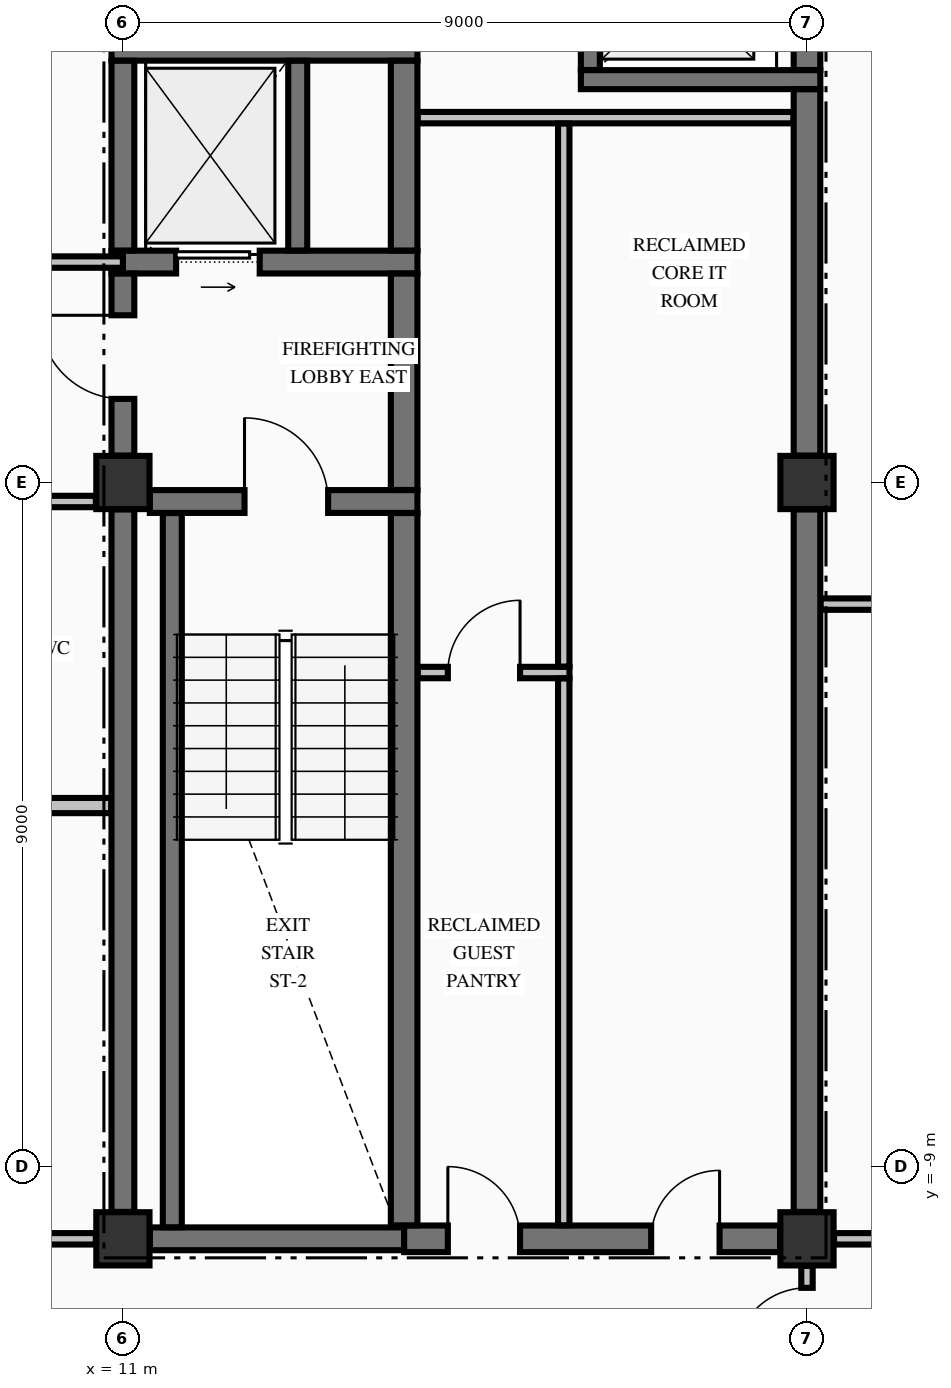
"""IFC4 building model, lengths in metres.
Left out: names, types, materials, properties, quantities, classifications, styles, units other than length and angle.
Written with IfcOpenShell. Run it as: python <this file> out.ifc"""

import sys

from ifc_helpers import new_model, si_unit, direction, frame, frame_2d, origin, origin_2d, place, context, subcontext, project, spatial, rectangle, extrude, element, fill, save


model = new_model("IFC4")
c1 = context("Model", 3, precision=1e-05, world=origin(), true_north=direction((0.0, 1.0)))
c2 = subcontext(c1, "Body", "Model", "MODEL_VIEW")
j1 = project(units=[si_unit("LENGTHUNIT", "METRE"), si_unit("PLANEANGLEUNIT", "RADIAN")], contexts=[c1])
p1 = place(None, origin())
s1 = spatial("IfcSite", under=j1, at=p1, CompositionType="ELEMENT")
p2 = place(p1, origin())
s2 = spatial("IfcBuilding", under=s1, at=p2, CompositionType="ELEMENT")
p3 = place(p2, frame((0.0, 0.0, 233.28)))
s3 = spatial("IfcBuildingStorey", under=s2, at=p3, CompositionType="ELEMENT", Elevation=233.28)
for number, where, z_axis, x_axis in (
    (1, (11.0, -9.95, -0.25), (0.0, 0.0, 1.0), (1.0, 0.0, 0.0)),
    (2, (11.0, 0.0, -0.25), (0.0, 0.0, 1.0), (1.0, 0.0, 0.0)),
    (3, (20.0, -9.95, -0.25), (0.0, 0.0, 1.0), (1.0, 0.0, 0.0)),
    (4, (20.0, 0.0, -0.25), (0.0, 0.0, 1.0), (1.0, 0.0, 0.0)),
):
    element("IfcColumn", number, at=place(p3, frame(where, z_axis=z_axis, x_axis=x_axis)), inside=s3, PredefinedType="COLUMN", context=c2, shape_type="SweptSolid", body=[
        extrude(rectangle(XDim=0.7, YDim=0.7, at=origin_2d()), origin(), (0.0, 0.0, 1.0), 3.23),
    ])
p4 = place(p3, frame((11.354, -9.95, 0.0), z_axis=(0.0, 0.0, 1.0), x_axis=(1.0, 0.0, 0.0)))
e5 = element("IfcWall", 5, at=p4, inside=s3, PredefinedType="SHEAR", context=c2, shape_type="SweptSolid", body=[
    extrude(rectangle(XDim=3.346, YDim=0.3, at=frame_2d((1.673, 0.0))), origin(), (0.0, 0.0, 1.0), 2.98),
])
p5 = place(p3, frame((14.7, -9.95, 0.0), z_axis=(0.0, 0.0, 1.0), x_axis=(1.0, 0.0, 0.0)))
e6 = element("IfcWall", 6, at=p5, inside=s3, PredefinedType="SHEAR", context=c2, shape_type="SweptSolid", body=[
    extrude(rectangle(XDim=4.946, YDim=0.35, at=frame_2d((2.473, 0.0))), origin(), (0.0, 0.0, 1.0), 2.98),
])
p6 = place(p5, frame((3.25, 0.0, 0.0)))
e7 = element("IfcOpeningElement", 7, at=p6, cuts=e6, PredefinedType="OPENING", context=c2, shape_type="SweptSolid", body=[
    extrude(rectangle(XDim=0.9, YDim=2.15, at=frame_2d((0.45, 1.075))), frame((0.0, 0.185, 0.0), z_axis=(0.0, -1.0, 0.0), x_axis=(1.0, 0.0, 0.0)), (0.0, 0.0, 1.0), 0.37),
])
p7 = place(p5, frame((0.575, 0.0, 0.0)))
e8 = element("IfcOpeningElement", 8, at=p7, cuts=e6, PredefinedType="OPENING", context=c2, shape_type="SweptSolid", body=[
    extrude(rectangle(XDim=0.95, YDim=2.15, at=frame_2d((0.475, 1.075))), frame((0.0, 0.185, 0.0), z_axis=(0.0, -1.0, 0.0), x_axis=(1.0, 0.0, 0.0)), (0.0, 0.0, 1.0), 0.37),
])
p8 = place(p3, frame((11.354, -0.25, 0.0), z_axis=(0.0, 0.0, 1.0), x_axis=(1.0, 0.0, 0.0)))
e9 = element("IfcWall", 9, at=p8, inside=s3, PredefinedType="SHEAR", context=c2, shape_type="SweptSolid", body=[
    extrude(rectangle(XDim=3.521, YDim=0.3, at=frame_2d((1.76, 0.0))), origin(), (0.0, 0.0, 1.0), 2.98),
])
p9 = place(p8, frame((1.246, 0.0, 0.0)))
e10 = element("IfcOpeningElement", 10, at=p9, cuts=e9, PredefinedType="OPENING", context=c2, shape_type="SweptSolid", body=[
    extrude(rectangle(XDim=1.1, YDim=2.15, at=frame_2d((0.55, 1.075))), frame((0.0, 0.16, 0.0), z_axis=(0.0, -1.0, 0.0), x_axis=(1.0, 0.0, 0.0)), (0.0, 0.0, 1.0), 0.32),
])
p10 = place(p3, frame((10.85, 2.9, 0.0), z_axis=(0.0, 0.0, 1.0), x_axis=(1.0, 0.0, 0.0)))
e11 = element("IfcWall", 11, at=p10, inside=s3, PredefinedType="SHEAR", context=c2, shape_type="SweptSolid", body=[
    extrude(rectangle(XDim=4.025, YDim=0.3, at=frame_2d((2.012, 0.0))), origin(), (0.0, 0.0, 1.0), 2.98),
])
p11 = place(p10, frame((0.85, 0.0, 0.0)))
e12 = element("IfcOpeningElement", 12, at=p11, cuts=e11, PredefinedType="OPENING", context=c2, shape_type="SweptSolid", body=[
    extrude(rectangle(XDim=1.1, YDim=2.2, at=frame_2d((0.55, 1.1))), frame((0.0, 0.16, 0.0), z_axis=(0.0, -1.0, 0.0), x_axis=(1.0, 0.0, 0.0)), (0.0, 0.0, 1.0), 0.32),
])
p12 = place(p3, frame((17.025, 5.3, 0.0), z_axis=(0.0, 0.0, 1.0), x_axis=(1.0, 0.0, 0.0)))
e13 = element("IfcWall", 13, at=p12, inside=s3, PredefinedType="SOLIDWALL", context=c2, shape_type="SweptSolid", body=[
    extrude(rectangle(XDim=3.15, YDim=0.25, at=frame_2d((1.575, 0.0))), origin(), (0.0, 0.0, 1.0), 2.98),
])
p13 = place(p3, frame((10.85, 5.7, 0.0), z_axis=(0.0, 0.0, 1.0), x_axis=(1.0, 0.0, 0.0)))
e14 = element("IfcWall", 14, at=p13, inside=s3, PredefinedType="SHEAR", context=c2, shape_type="SweptSolid", body=[
    extrude(rectangle(XDim=4.025, YDim=0.3, at=frame_2d((2.012, 0.0))), origin(), (0.0, 0.0, 1.0), 2.98),
])
p14 = place(p3, frame((-10.644, -9.95, 0.0), z_axis=(0.0, 0.0, 1.0), x_axis=(1.0, 0.0, 0.0)))
e15 = element("IfcWall", 15, at=p14, inside=s3, PredefinedType="PARTITIONING", context=c2, shape_type="SweptSolid", body=[
    extrude(rectangle(XDim=21.288, YDim=0.15, at=frame_2d((10.644, 0.0))), origin(), (0.0, 0.0, 1.0), 2.98),
])
p15 = place(p14, frame((8.294, 0.0, 0.0)))
e16 = element("IfcOpeningElement", 16, at=p15, cuts=e15, PredefinedType="OPENING", context=c2, shape_type="SweptSolid", body=[
    extrude(rectangle(XDim=1.1, YDim=2.15, at=frame_2d((0.55, 1.075))), frame((0.0, 0.085, 0.0), z_axis=(0.0, -1.0, 0.0), x_axis=(1.0, 0.0, 0.0)), (0.0, 0.0, 1.0), 0.17),
])
p16 = place(p14, frame((13.769, 0.0, 0.0)))
e17 = element("IfcOpeningElement", 17, at=p16, cuts=e15, PredefinedType="OPENING", context=c2, shape_type="SweptSolid", body=[
    extrude(rectangle(XDim=0.95, YDim=2.15, at=frame_2d((0.475, 1.075))), frame((0.0, 0.085, 0.0), z_axis=(0.0, -1.0, 0.0), x_axis=(1.0, 0.0, 0.0)), (0.0, 0.0, 1.0), 0.17),
])
p17 = place(p14, frame((17.994, 0.0, 0.0)))
e18 = element("IfcOpeningElement", 18, at=p17, cuts=e15, PredefinedType="OPENING", context=c2, shape_type="SweptSolid", body=[
    extrude(rectangle(XDim=0.9, YDim=2.15, at=frame_2d((0.45, 1.075))), frame((0.0, 0.085, 0.0), z_axis=(0.0, -1.0, 0.0), x_axis=(1.0, 0.0, 0.0)), (0.0, 0.0, 1.0), 0.17),
])
p18 = place(p3, frame((20.356, -9.95, 0.0), z_axis=(0.0, 0.0, 1.0), x_axis=(1.0, 0.0, 0.0)))
e19 = element("IfcWall", 19, at=p18, inside=s3, PredefinedType="PARTITIONING", context=c2, shape_type="SweptSolid", body=[
    extrude(rectangle(XDim=5.479, YDim=0.15, at=frame_2d((2.74, 0.0))), origin(), (0.0, 0.0, 1.0), 2.98),
])
p19 = place(p18, frame((2.169, 0.0, 0.0)))
e20 = element("IfcOpeningElement", 20, at=p19, cuts=e19, PredefinedType="OPENING", context=c2, shape_type="SweptSolid", body=[
    extrude(rectangle(XDim=0.95, YDim=2.15, at=frame_2d((0.475, 1.075))), frame((0.0, 0.085, 0.0), z_axis=(0.0, -1.0, 0.0), x_axis=(1.0, 0.0, 0.0)), (0.0, 0.0, 1.0), 0.17),
])
p20 = place(p3, frame((-0.775, -4.25, 0.0), z_axis=(0.0, 0.0, 1.0), x_axis=(1.0, 0.0, 0.0)))
e21 = element("IfcWall", 21, at=p20, inside=s3, PredefinedType="PARTITIONING", context=c2, shape_type="SweptSolid", body=[
    extrude(rectangle(XDim=11.622, YDim=0.2, at=frame_2d((5.811, 0.0))), origin(), (0.0, 0.0, 1.0), 2.98),
])
p21 = place(p3, frame((14.878, -2.5, 0.0), z_axis=(0.0, 0.0, 1.0), x_axis=(1.0, 0.0, 0.0)))
e22 = element("IfcWall", 22, at=p21, inside=s3, PredefinedType="PARTITIONING", context=c2, shape_type="SweptSolid", body=[
    extrude(rectangle(XDim=1.997, YDim=0.15, at=frame_2d((0.999, 0.0))), origin(), (0.0, 0.0, 1.0), 2.98),
])
p22 = place(p21, frame((0.397, 0.0, 0.0)))
e23 = element("IfcOpeningElement", 23, at=p22, cuts=e22, PredefinedType="OPENING", context=c2, shape_type="SweptSolid", body=[
    extrude(rectangle(XDim=0.95, YDim=2.15, at=frame_2d((0.475, 1.075))), frame((0.0, 0.085, 0.0), z_axis=(0.0, -1.0, 0.0), x_axis=(1.0, 0.0, 0.0)), (0.0, 0.0, 1.0), 0.17),
])
p23 = place(p3, frame((20.178, -1.6, 0.0), z_axis=(0.0, 0.0, 1.0), x_axis=(1.0, 0.0, 0.0)))
e24 = element("IfcWall", 24, at=p23, inside=s3, PredefinedType="PARTITIONING", context=c2, shape_type="SweptSolid", body=[
    extrude(rectangle(XDim=5.657, YDim=0.15, at=frame_2d((2.829, 0.0))), origin(), (0.0, 0.0, 1.0), 2.98),
])
p24 = place(p3, frame((-10.644, -0.25, 0.0), z_axis=(0.0, 0.0, 1.0), x_axis=(1.0, 0.0, 0.0)))
e25 = element("IfcWall", 25, at=p24, inside=s3, PredefinedType="PARTITIONING", context=c2, shape_type="SweptSolid", body=[
    extrude(rectangle(XDim=21.288, YDim=0.15, at=frame_2d((10.644, 0.0))), origin(), (0.0, 0.0, 1.0), 2.98),
])
p25 = place(p24, frame((8.294, 0.0, 0.0)))
e26 = element("IfcOpeningElement", 26, at=p25, cuts=e25, PredefinedType="OPENING", context=c2, shape_type="SweptSolid", body=[
    extrude(rectangle(XDim=1.1, YDim=2.15, at=frame_2d((0.55, 1.075))), frame((0.0, 0.085, 0.0), z_axis=(0.0, -1.0, 0.0), x_axis=(1.0, 0.0, 0.0)), (0.0, 0.0, 1.0), 0.17),
])
p26 = place(p24, frame((3.169, 0.0, 0.0)))
e27 = element("IfcOpeningElement", 27, at=p26, cuts=e25, PredefinedType="OPENING", context=c2, shape_type="SweptSolid", body=[
    extrude(rectangle(XDim=1.05, YDim=2.15, at=frame_2d((0.525, 1.075))), frame((0.0, 0.085, 0.0), z_axis=(0.0, -1.0, 0.0), x_axis=(1.0, 0.0, 0.0)), (0.0, 0.0, 1.0), 0.17),
])
p27 = place(p24, frame((15.319, 0.0, 0.0)))
e28 = element("IfcOpeningElement", 28, at=p27, cuts=e25, PredefinedType="OPENING", context=c2, shape_type="SweptSolid", body=[
    extrude(rectangle(XDim=0.95, YDim=2.15, at=frame_2d((0.475, 1.075))), frame((0.0, 0.085, 0.0), z_axis=(0.0, -1.0, 0.0), x_axis=(1.0, 0.0, 0.0)), (0.0, 0.0, 1.0), 0.17),
])
p28 = place(p3, frame((-11.0, 2.9, 0.0), z_axis=(0.0, 0.0, 1.0), x_axis=(1.0, 0.0, 0.0)))
e29 = element("IfcWall", 29, at=p28, inside=s3, PredefinedType="PARTITIONING", context=c2, shape_type="SweptSolid", body=[
    extrude(rectangle(XDim=22.0, YDim=0.15, at=frame_2d((11.0, 0.0))), origin(), (0.0, 0.0, 1.0), 2.98),
])
p29 = place(p28, frame((8.65, 0.0, 0.0)))
e30 = element("IfcOpeningElement", 30, at=p29, cuts=e29, PredefinedType="OPENING", context=c2, shape_type="SweptSolid", body=[
    extrude(rectangle(XDim=1.1, YDim=2.15, at=frame_2d((0.55, 1.075))), frame((0.0, 0.085, 0.0), z_axis=(0.0, -1.0, 0.0), x_axis=(1.0, 0.0, 0.0)), (0.0, 0.0, 1.0), 0.17),
])
p30 = place(p28, frame((3.525, 0.0, 0.0)))
e31 = element("IfcOpeningElement", 31, at=p30, cuts=e29, PredefinedType="OPENING", context=c2, shape_type="SweptSolid", body=[
    extrude(rectangle(XDim=1.05, YDim=2.15, at=frame_2d((0.525, 1.075))), frame((0.0, 0.085, 0.0), z_axis=(0.0, -1.0, 0.0), x_axis=(1.0, 0.0, 0.0)), (0.0, 0.0, 1.0), 0.17),
])
p31 = place(p28, frame((12.225, 0.0, 0.0)))
e32 = element("IfcOpeningElement", 32, at=p31, cuts=e29, PredefinedType="OPENING", context=c2, shape_type="SweptSolid", body=[
    extrude(rectangle(XDim=0.95, YDim=2.15, at=frame_2d((0.475, 1.075))), frame((0.0, 0.085, 0.0), z_axis=(0.0, -1.0, 0.0), x_axis=(1.0, 0.0, 0.0)), (0.0, 0.0, 1.0), 0.17),
])
p32 = place(p28, frame((18.075, 0.0, 0.0)))
e33 = element("IfcOpeningElement", 33, at=p32, cuts=e29, PredefinedType="OPENING", context=c2, shape_type="SweptSolid", body=[
    extrude(rectangle(XDim=0.95, YDim=2.15, at=frame_2d((0.475, 1.075))), frame((0.0, 0.085, 0.0), z_axis=(0.0, -1.0, 0.0), x_axis=(1.0, 0.0, 0.0)), (0.0, 0.0, 1.0), 0.17),
])
p33 = place(p3, frame((14.878, 4.8, 0.0), z_axis=(0.0, 0.0, 1.0), x_axis=(1.0, 0.0, 0.0)))
e34 = element("IfcWall", 34, at=p33, inside=s3, PredefinedType="PARTITIONING", context=c2, shape_type="SweptSolid", body=[
    extrude(rectangle(XDim=4.944, YDim=0.15, at=frame_2d((2.472, 0.0))), origin(), (0.0, 0.0, 1.0), 2.98),
])
p34 = place(p3, frame((11.0, -9.596, 0.0), z_axis=(0.0, 0.0, 1.0), x_axis=(0.0, 1.0, 0.0)))
e35 = element("IfcWall", 35, at=p34, inside=s3, PredefinedType="SHEAR", context=c2, shape_type="SweptSolid", body=[
    extrude(rectangle(XDim=9.242, YDim=0.3, at=frame_2d((4.621, 0.0))), origin(), (0.0, 0.0, 1.0), 2.98),
])
p35 = place(p3, frame((11.0, 0.354, 0.0), z_axis=(0.0, 0.0, 1.0), x_axis=(0.0, 1.0, 0.0)))
e36 = element("IfcWall", 36, at=p35, inside=s3, PredefinedType="SHEAR", context=c2, shape_type="SweptSolid", body=[
    extrude(rectangle(XDim=2.394, YDim=0.3, at=frame_2d((1.197, 0.0))), origin(), (0.0, 0.0, 1.0), 2.98),
])
p36 = place(p35, frame((0.746, 0.0, 0.0)))
e37 = element("IfcOpeningElement", 37, at=p36, cuts=e36, PredefinedType="OPENING", context=c2, shape_type="SweptSolid", body=[
    extrude(rectangle(XDim=1.1, YDim=2.15, at=frame_2d((0.55, 1.075))), frame((0.0, 0.16, 0.0), z_axis=(0.0, -1.0, 0.0), x_axis=(1.0, 0.0, 0.0)), (0.0, 0.0, 1.0), 0.32),
])
p37 = place(p3, frame((11.0, 3.052, 0.0), z_axis=(0.0, 0.0, 1.0), x_axis=(0.0, 1.0, 0.0)))
e38 = element("IfcWall", 38, at=p37, inside=s3, PredefinedType="SHEAR", context=c2, shape_type="SweptSolid", body=[
    extrude(rectangle(XDim=2.496, YDim=0.3, at=frame_2d((1.248, 0.0))), origin(), (0.0, 0.0, 1.0), 2.98),
])
p38 = place(p3, frame((11.65, -9.798, 0.0), z_axis=(0.0, 0.0, 1.0), x_axis=(0.0, 1.0, 0.0)))
e39 = element("IfcWall", 39, at=p38, inside=s3, PredefinedType="SOLIDWALL", context=c2, shape_type="SweptSolid", body=[
    extrude(rectangle(XDim=9.396, YDim=0.25, at=frame_2d((4.698, 0.0))), origin(), (0.0, 0.0, 1.0), 2.98),
])
p39 = place(p3, frame((13.3, 3.052, 0.0), z_axis=(0.0, 0.0, 1.0), x_axis=(0.0, 1.0, 0.0)))
e40 = element("IfcWall", 40, at=p39, inside=s3, PredefinedType="SOLIDWALL", context=c2, shape_type="SweptSolid", body=[
    extrude(rectangle(XDim=2.496, YDim=0.25, at=frame_2d((1.248, 0.0))), origin(), (0.0, 0.0, 1.0), 2.98),
])
p40 = place(p3, frame((14.7, -9.773, 0.0), z_axis=(0.0, 0.0, 1.0), x_axis=(0.0, 1.0, 0.0)))
e41 = element("IfcWall", 41, at=p40, inside=s3, PredefinedType="SHEAR", context=c2, shape_type="SweptSolid", body=[
    extrude(rectangle(XDim=9.371, YDim=0.35, at=frame_2d((4.686, 0.0))), origin(), (0.0, 0.0, 1.0), 2.98),
])
p41 = place(p3, frame((14.7, -0.098, 0.0), z_axis=(0.0, 0.0, 1.0), x_axis=(0.0, 1.0, 0.0)))
e42 = element("IfcWall", 42, at=p41, inside=s3, PredefinedType="SHEAR", context=c2, shape_type="SweptSolid", body=[
    extrude(rectangle(XDim=2.846, YDim=0.35, at=frame_2d((1.423, 0.0))), origin(), (0.0, 0.0, 1.0), 2.98),
])
p42 = place(p3, frame((14.7, 3.052, 0.0), z_axis=(0.0, 0.0, 1.0), x_axis=(0.0, 1.0, 0.0)))
e43 = element("IfcWall", 43, at=p42, inside=s3, PredefinedType="SHEAR", context=c2, shape_type="SweptSolid", body=[
    extrude(rectangle(XDim=2.496, YDim=0.35, at=frame_2d((1.248, 0.0))), origin(), (0.0, 0.0, 1.0), 2.98),
])
p43 = place(p3, frame((17.15, 5.427, 0.0), z_axis=(0.0, 0.0, 1.0), x_axis=(0.0, 1.0, 0.0)))
e44 = element("IfcWall", 44, at=p43, inside=s3, PredefinedType="SOLIDWALL", context=c2, shape_type="SweptSolid", body=[
    extrude(rectangle(XDim=2.196, YDim=0.25, at=frame_2d((1.098, 0.0))), origin(), (0.0, 0.0, 1.0), 2.98),
])
p44 = place(p43, frame((0.548, 0.0, 0.0)))
e45 = element("IfcOpeningElement", 45, at=p44, cuts=e44, PredefinedType="OPENING", context=c2, shape_type="SweptSolid", body=[
    extrude(rectangle(XDim=1.1, YDim=2.2, at=frame_2d((0.55, 1.1))), frame((0.0, 0.135, 0.0), z_axis=(0.0, -1.0, 0.0), x_axis=(1.0, 0.0, 0.0)), (0.0, 0.0, 1.0), 0.27),
])
p45 = place(p3, frame((20.0, -9.596, 0.0), z_axis=(0.0, 0.0, 1.0), x_axis=(0.0, 1.0, 0.0)))
e46 = element("IfcWall", 46, at=p45, inside=s3, PredefinedType="SHEAR", context=c2, shape_type="SweptSolid", body=[
    extrude(rectangle(XDim=9.242, YDim=0.35, at=frame_2d((4.621, 0.0))), origin(), (0.0, 0.0, 1.0), 2.98),
])
p46 = place(p3, frame((20.0, 0.354, 0.0), z_axis=(0.0, 0.0, 1.0), x_axis=(0.0, 1.0, 0.0)))
e47 = element("IfcWall", 47, at=p46, inside=s3, PredefinedType="SHEAR", context=c2, shape_type="SweptSolid", body=[
    extrude(rectangle(XDim=4.819, YDim=0.35, at=frame_2d((2.41, 0.0))), origin(), (0.0, 0.0, 1.0), 2.98),
])
p47 = place(p3, frame((20.0, 5.427, 0.0), z_axis=(0.0, 0.0, 1.0), x_axis=(0.0, 1.0, 0.0)))
e48 = element("IfcWall", 48, at=p47, inside=s3, PredefinedType="SHEAR", context=c2, shape_type="SweptSolid", body=[
    extrude(rectangle(XDim=2.196, YDim=0.35, at=frame_2d((1.098, 0.0))), origin(), (0.0, 0.0, 1.0), 2.98),
])
p48 = place(p3, frame((16.8, -9.772, 0.0), z_axis=(0.0, 0.0, 1.0), x_axis=(0.0, 1.0, 0.0)))
e49 = element("IfcWall", 49, at=p48, inside=s3, PredefinedType="PARTITIONING", context=c2, shape_type="SweptSolid", body=[
    extrude(rectangle(XDim=7.194, YDim=0.15, at=frame_2d((3.597, 0.0))), origin(), (0.0, 0.0, 1.0), 2.98),
])
p49 = place(p3, frame((16.8, -2.422, 0.0), z_axis=(0.0, 0.0, 1.0), x_axis=(0.0, 1.0, 0.0)))
e50 = element("IfcWall", 50, at=p49, inside=s3, PredefinedType="PARTITIONING", context=c2, shape_type="SweptSolid", body=[
    extrude(rectangle(XDim=7.144, YDim=0.15, at=frame_2d((3.572, 0.0))), origin(), (0.0, 0.0, 1.0), 2.98),
])
p50 = place(p3, frame((20.0, -12.122, 0.0), z_axis=(0.0, 0.0, 1.0), x_axis=(0.0, 1.0, 0.0)))
e51 = element("IfcWall", 51, at=p50, inside=s3, PredefinedType="PARTITIONING", context=c2, shape_type="SweptSolid", body=[
    extrude(rectangle(XDim=1.816, YDim=0.15, at=frame_2d((0.908, 0.0))), origin(), (0.0, 0.0, 1.0), 2.98),
])
p51 = place(p50, frame((0.577, 0.0, 0.0)))
e52 = element("IfcOpeningElement", 52, at=p51, cuts=e51, PredefinedType="OPENING", context=c2, shape_type="SweptSolid", body=[
    extrude(rectangle(XDim=0.95, YDim=2.15, at=frame_2d((0.475, 1.075))), frame((0.0, 0.085, 0.0), z_axis=(0.0, -1.0, 0.0), x_axis=(1.0, 0.0, 0.0)), (0.0, 0.0, 1.0), 0.17),
])
p52 = place(p9, origin())
e53 = element("IfcDoor", 53, at=p52, inside=s3, OperationType="SINGLE_SWING_LEFT", PredefinedType="DOOR", context=c2, shape_type="SweptSolid", body=[
    extrude(rectangle(XDim=1.1, YDim=2.15, at=frame_2d((0.55, 1.075))), frame((0.0, 0.025, 0.0), z_axis=(0.0, -1.0, 0.0), x_axis=(1.0, 0.0, 0.0)), (0.0, 0.0, 1.0), 0.05),
])
fill(e10, e53)
p53 = place(p36, origin())
e54 = element("IfcDoor", 54, at=p53, inside=s3, OperationType="SINGLE_SWING_RIGHT", PredefinedType="DOOR", context=c2, shape_type="SweptSolid", body=[
    extrude(rectangle(XDim=1.1, YDim=2.15, at=frame_2d((0.55, 1.075))), frame((0.0, 0.025, 0.0), z_axis=(0.0, -1.0, 0.0), x_axis=(1.0, 0.0, 0.0)), (0.0, 0.0, 1.0), 0.05),
])
fill(e37, e54)
p54 = place(p11, origin())
e55 = element("IfcDoor", 55, at=p54, inside=s3, OperationType="SLIDING_TO_RIGHT", PredefinedType="DOOR", context=c2, shape_type="SweptSolid", body=[
    extrude(rectangle(XDim=1.1, YDim=2.2, at=frame_2d((0.55, 1.1))), frame((0.0, 0.025, 0.0), z_axis=(0.0, -1.0, 0.0), x_axis=(1.0, 0.0, 0.0)), (0.0, 0.0, 1.0), 0.05),
])
fill(e12, e55)
p55 = place(p6, origin())
e56 = element("IfcDoor", 56, at=p55, inside=s3, OperationType="SINGLE_SWING_RIGHT", PredefinedType="DOOR", context=c2, shape_type="SweptSolid", body=[
    extrude(rectangle(XDim=0.9, YDim=2.15, at=frame_2d((0.45, 1.075))), frame((0.0, 0.025, 0.0), z_axis=(0.0, -1.0, 0.0), x_axis=(1.0, 0.0, 0.0)), (0.0, 0.0, 1.0), 0.05),
])
fill(e7, e56)
p56 = place(p7, origin())
e57 = element("IfcDoor", 57, at=p56, inside=s3, OperationType="SINGLE_SWING_LEFT", PredefinedType="DOOR", context=c2, shape_type="SweptSolid", body=[
    extrude(rectangle(XDim=0.95, YDim=2.15, at=frame_2d((0.475, 1.075))), frame((0.0, 0.025, 0.0), z_axis=(0.0, -1.0, 0.0), x_axis=(1.0, 0.0, 0.0)), (0.0, 0.0, 1.0), 0.05),
])
fill(e8, e57)
p57 = place(p22, origin())
e58 = element("IfcDoor", 58, at=p57, inside=s3, OperationType="SINGLE_SWING_RIGHT", PredefinedType="DOOR", context=c2, shape_type="SweptSolid", body=[
    extrude(rectangle(XDim=0.95, YDim=2.15, at=frame_2d((0.475, 1.075))), frame((0.0, 0.025, 0.0), z_axis=(0.0, -1.0, 0.0), x_axis=(1.0, 0.0, 0.0)), (0.0, 0.0, 1.0), 0.05),
])
fill(e23, e58)
p58 = place(p51, origin())
e59 = element("IfcDoor", 59, at=p58, inside=s3, OperationType="SINGLE_SWING_LEFT", PredefinedType="DOOR", context=c2, shape_type="SweptSolid", body=[
    extrude(rectangle(XDim=0.95, YDim=2.15, at=frame_2d((0.475, 1.075))), frame((0.0, 0.025, 0.0), z_axis=(0.0, -1.0, 0.0), x_axis=(1.0, 0.0, 0.0)), (0.0, 0.0, 1.0), 0.05),
])
fill(e52, e59)
save(model, sys.argv[1])
